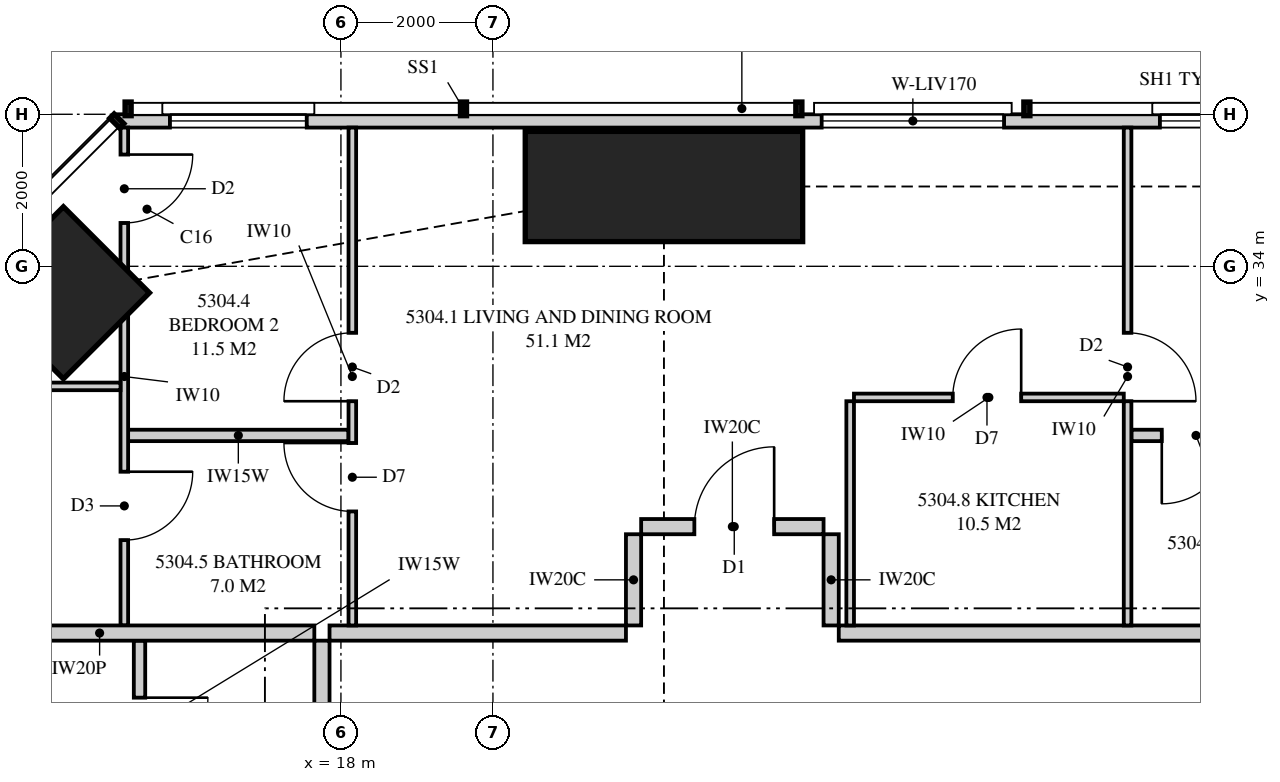
"""IFC4 building model, lengths in metres.
Left out: names, types, materials, properties, quantities, classifications, styles, units other than length and angle.
Written with IfcOpenShell. Run it as: python <this file> out.ifc"""

import sys

from ifc_helpers import new_model, si_unit, direction, frame, frame_2d, origin, origin_2d, place, context, subcontext, project, spatial, polyline, rectangle, outline, extrude, element, fill, save


model = new_model("IFC4")
c1 = context("Model", 3, precision=1e-05, world=origin(), true_north=direction((0.0, 1.0)))
c2 = subcontext(c1, "Body", "Model", "MODEL_VIEW")
j1 = project(units=[si_unit("LENGTHUNIT", "METRE"), si_unit("PLANEANGLEUNIT", "RADIAN")], contexts=[c1])
p1 = place(None, origin())
s1 = spatial("IfcSite", under=j1, at=p1, CompositionType="ELEMENT")
p2 = place(p1, origin())
s2 = spatial("IfcBuilding", under=s1, at=p2, CompositionType="ELEMENT")
p3 = place(p2, frame((0.0, 0.0, 194.55)))
s3 = spatial("IfcBuildingStorey", under=s2, at=p3, CompositionType="ELEMENT", Elevation=194.55)
p4 = place(p3, frame((22.25, 35.05, 0.0), z_axis=(0.0, 0.0, 1.0), x_axis=(0.0, 1.0, 0.0)))
e1 = element("IfcColumn", 1, at=p4, inside=s3, PredefinedType="COLUMN", context=c2, shape_type="SweptSolid", body=[
    extrude(rectangle(XDim=1.45, YDim=3.65, at=origin_2d()), origin(), (0.0, 0.0, 1.0), 3.35),
])
p5 = place(p3, frame((14.348, 33.652, 0.0), z_axis=(0.0, 0.0, 1.0), x_axis=(0.707106781187, 0.707106781187, 0.0)))
e2 = element("IfcColumn", 2, at=p5, inside=s3, PredefinedType="COLUMN", context=c2, shape_type="SweptSolid", body=[
    extrude(rectangle(XDim=1.6, YDim=1.6, at=origin_2d()), origin(), (0.0, 0.0, 1.0), 3.35),
])
p6 = place(p3, frame((49.949, 35.913, 0.0), z_axis=(0.0, 0.0, 1.0), x_axis=(-1.0, 0.0, 0.0)))
e3 = element("IfcWall", 3, at=p6, inside=s3, PredefinedType="SOLIDWALL", context=c2, shape_type="SweptSolid", body=[
    extrude(outline(polyline([(0.0, 0.0), (34.897, 0.0), (34.897, 3.11), (27.91, 3.11), (27.91, 2.15), (27.836, 2.15), (27.836, 3.11), (27.699, 3.11), (27.699, 2.15), (7.199, 2.15), (7.199, 3.11), (7.062, 3.11), (7.062, 2.15), (6.987, 2.15), (6.987, 3.11), (0.0, 3.11), (0.0, 0.0)])), frame((0.0, 0.087, 0.0), z_axis=(0.0, -1.0, 0.0), x_axis=(1.0, 0.0, 0.0)), (0.0, 0.0, 1.0), 0.175),
])
p7 = place(p6, frame((2.149, 0.0, 0.4)))
e4 = element("IfcOpeningElement", 4, at=p7, cuts=e3, PredefinedType="OPENING", context=c2, shape_type="SweptSolid", body=[
    extrude(rectangle(XDim=1.8, YDim=1.7, at=frame_2d((0.9, 0.85))), frame((0.0, 0.097, 0.0), z_axis=(0.0, -1.0, 0.0), x_axis=(1.0, 0.0, 0.0)), (0.0, 0.0, 1.0), 0.195),
])
p8 = place(p6, frame((9.636, 0.0, 0.4)))
e5 = element("IfcOpeningElement", 5, at=p8, cuts=e3, PredefinedType="OPENING", context=c2, shape_type="SweptSolid", body=[
    extrude(rectangle(XDim=1.8, YDim=1.7, at=frame_2d((0.9, 0.85))), frame((0.0, 0.097, 0.0), z_axis=(0.0, -1.0, 0.0), x_axis=(1.0, 0.0, 0.0)), (0.0, 0.0, 1.0), 0.195),
])
p9 = place(p6, frame((13.174, 0.0, 0.0)))
e6 = element("IfcOpeningElement", 6, at=p9, cuts=e3, PredefinedType="OPENING", context=c2, shape_type="SweptSolid", body=[
    extrude(rectangle(XDim=1.8, YDim=2.1, at=frame_2d((0.9, 1.05))), frame((0.0, 0.097, 0.0), z_axis=(0.0, -1.0, 0.0), x_axis=(1.0, 0.0, 0.0)), (0.0, 0.0, 1.0), 0.195),
])
p10 = place(p6, frame((19.374, 0.0, 0.4)))
e7 = element("IfcOpeningElement", 7, at=p10, cuts=e3, PredefinedType="OPENING", context=c2, shape_type="SweptSolid", body=[
    extrude(rectangle(XDim=1.8, YDim=1.7, at=frame_2d((0.9, 0.85))), frame((0.0, 0.097, 0.0), z_axis=(0.0, -1.0, 0.0), x_axis=(1.0, 0.0, 0.0)), (0.0, 0.0, 1.0), 0.195),
])
p11 = place(p6, frame((23.224, 0.0, 0.4)))
e8 = element("IfcOpeningElement", 8, at=p11, cuts=e3, PredefinedType="OPENING", context=c2, shape_type="SweptSolid", body=[
    extrude(rectangle(XDim=2.4, YDim=1.7, at=frame_2d((1.2, 0.85))), frame((0.0, 0.097, 0.0), z_axis=(0.0, -1.0, 0.0), x_axis=(1.0, 0.0, 0.0)), (0.0, 0.0, 1.0), 0.195),
])
p12 = place(p6, frame((32.399, 0.0, 0.4)))
e9 = element("IfcOpeningElement", 9, at=p12, cuts=e3, PredefinedType="OPENING", context=c2, shape_type="SweptSolid", body=[
    extrude(rectangle(XDim=1.8, YDim=1.7, at=frame_2d((0.9, 0.85))), frame((0.0, 0.097, 0.0), z_axis=(0.0, -1.0, 0.0), x_axis=(1.0, 0.0, 0.0)), (0.0, 0.0, 1.0), 0.195),
])
p13 = place(p3, frame((17.85, 29.175, 0.0), z_axis=(0.0, 0.0, 1.0), x_axis=(1.0, 0.0, 0.0)))
e10 = element("IfcWall", 10, at=p13, inside=s3, PredefinedType="PARTITIONING", context=c2, shape_type="SweptSolid", body=[
    extrude(rectangle(XDim=3.9, YDim=0.2, at=frame_2d((1.95, 0.0))), origin(), (0.0, 0.0, 1.0), 3.11),
])
p14 = place(p3, frame((15.15, 35.825, 0.0), z_axis=(0.0, 0.0, 1.0), x_axis=(0.0, -1.0, 0.0)))
e11 = element("IfcWall", 11, at=p14, inside=s3, PredefinedType="PARTITIONING", context=c2, shape_type="SweptSolid", body=[
    extrude(outline(polyline([(0.0, 0.0), (6.55, 0.0), (6.55, 3.11), (2.905, 3.11), (2.905, 2.15), (1.158, 2.15), (1.158, 3.11), (0.0, 3.11), (0.0, 0.0)])), frame((0.0, 0.05, 0.0), z_axis=(0.0, -1.0, 0.0), x_axis=(1.0, 0.0, 0.0)), (0.0, 0.0, 1.0), 0.1),
])
p15 = place(p14, frame((0.355, 0.0, 0.0)))
e12 = element("IfcOpeningElement", 12, at=p15, cuts=e11, PredefinedType="OPENING", context=c2, shape_type="SweptSolid", body=[
    extrude(rectangle(XDim=0.9, YDim=2.1, at=frame_2d((0.45, 1.05))), frame((0.0, 0.06, 0.0), z_axis=(0.0, -1.0, 0.0), x_axis=(1.0, 0.0, 0.0)), (0.0, 0.0, 1.0), 0.12),
])
p16 = place(p14, frame((4.527, 0.0, 0.0)))
e13 = element("IfcOpeningElement", 13, at=p16, cuts=e11, PredefinedType="OPENING", context=c2, shape_type="SweptSolid", body=[
    extrude(rectangle(XDim=0.9, YDim=2.1, at=frame_2d((0.45, 1.05))), frame((0.0, 0.06, 0.0), z_axis=(0.0, -1.0, 0.0), x_axis=(1.0, 0.0, 0.0)), (0.0, 0.0, 1.0), 0.12),
])
p17 = place(p3, frame((18.15, 35.825, 0.0), z_axis=(0.0, 0.0, 1.0), x_axis=(0.0, -1.0, 0.0)))
e14 = element("IfcWall", 14, at=p17, inside=s3, PredefinedType="PARTITIONING", context=c2, shape_type="SweptSolid", body=[
    extrude(outline(polyline([(0.0, 0.0), (6.55, 0.0), (6.55, 3.11), (2.374, 3.11), (2.374, 2.15), (0.627, 2.15), (0.627, 3.11), (0.0, 3.11), (0.0, 0.0)])), frame((0.0, 0.05, 0.0), z_axis=(0.0, -1.0, 0.0), x_axis=(1.0, 0.0, 0.0)), (0.0, 0.0, 1.0), 0.1),
])
p18 = place(p17, frame((2.7, 0.0, 0.0)))
e15 = element("IfcOpeningElement", 15, at=p18, cuts=e14, PredefinedType="OPENING", context=c2, shape_type="SweptSolid", body=[
    extrude(rectangle(XDim=0.9, YDim=2.1, at=frame_2d((0.45, 1.05))), frame((0.0, 0.06, 0.0), z_axis=(0.0, -1.0, 0.0), x_axis=(1.0, 0.0, 0.0)), (0.0, 0.0, 1.0), 0.12),
])
p19 = place(p17, frame((4.15, 0.0, 0.0)))
e16 = element("IfcOpeningElement", 16, at=p19, cuts=e14, PredefinedType="OPENING", context=c2, shape_type="SweptSolid", body=[
    extrude(rectangle(XDim=0.9, YDim=2.1, at=frame_2d((0.45, 1.05))), frame((0.0, 0.06, 0.0), z_axis=(0.0, -1.0, 0.0), x_axis=(1.0, 0.0, 0.0)), (0.0, 0.0, 1.0), 0.12),
])
p20 = place(p3, frame((28.35, 35.825, 0.0), z_axis=(0.0, 0.0, 1.0), x_axis=(0.0, -1.0, 0.0)))
e17 = element("IfcWall", 17, at=p20, inside=s3, PredefinedType="PARTITIONING", context=c2, shape_type="SweptSolid", body=[
    extrude(outline(polyline([(0.0, 0.0), (6.55, 0.0), (6.55, 3.11), (1.635, 3.11), (1.635, 2.15), (0.0, 2.15), (0.0, 3.11), (0.0, 0.0)])), frame((0.0, 0.05, 0.0), z_axis=(0.0, -1.0, 0.0), x_axis=(1.0, 0.0, 0.0)), (0.0, 0.0, 1.0), 0.1),
])
p21 = place(p20, frame((2.7, 0.0, 0.0)))
e18 = element("IfcOpeningElement", 18, at=p21, cuts=e17, PredefinedType="OPENING", context=c2, shape_type="SweptSolid", body=[
    extrude(rectangle(XDim=0.9, YDim=2.1, at=frame_2d((0.45, 1.05))), frame((0.0, 0.06, 0.0), z_axis=(0.0, -1.0, 0.0), x_axis=(1.0, 0.0, 0.0)), (0.0, 0.0, 1.0), 0.12),
])
p22 = place(p3, frame((12.0, 32.42, 0.0), z_axis=(0.0, 0.0, 1.0), x_axis=(1.0, 0.0, 0.0)))
e19 = element("IfcWall", 19, at=p22, inside=s3, PredefinedType="PARTITIONING", context=c2, shape_type="SweptSolid", body=[
    extrude(outline(polyline([(0.0, 0.0), (3.1, 0.0), (3.1, 3.11), (3.021, 3.11), (3.021, 2.15), (1.278, 2.15), (1.278, 3.11), (0.0, 3.11), (0.0, 0.0)])), frame((0.0, 0.05, 0.0), z_axis=(0.0, -1.0, 0.0), x_axis=(1.0, 0.0, 0.0)), (0.0, 0.0, 1.0), 0.1),
])
p23 = place(p22, frame((0.45, 0.0, 0.0)))
e20 = element("IfcOpeningElement", 20, at=p23, cuts=e19, PredefinedType="OPENING", context=c2, shape_type="SweptSolid", body=[
    extrude(rectangle(XDim=0.9, YDim=2.1, at=frame_2d((0.45, 1.05))), frame((0.0, 0.06, 0.0), z_axis=(0.0, -1.0, 0.0), x_axis=(1.0, 0.0, 0.0)), (0.0, 0.0, 1.0), 0.12),
])
p24 = place(p3, frame((15.2, 31.775, 0.0), z_axis=(0.0, 0.0, 1.0), x_axis=(1.0, 0.0, 0.0)))
e21 = element("IfcWall", 21, at=p24, inside=s3, PredefinedType="PLUMBINGWALL", context=c2, shape_type="SweptSolid", body=[
    extrude(rectangle(XDim=2.9, YDim=0.15, at=frame_2d((1.45, 0.0))), origin(), (0.0, 0.0, 1.0), 3.11),
])
p25 = place(p3, frame((28.4, 31.775, 0.0), z_axis=(0.0, 0.0, 1.0), x_axis=(1.0, 0.0, 0.0)))
e22 = element("IfcWall", 22, at=p25, inside=s3, PredefinedType="PLUMBINGWALL", context=c2, shape_type="SweptSolid", body=[
    extrude(outline(polyline([(0.0, 0.0), (5.8, 0.0), (5.8, 3.11), (4.412, 3.11), (4.412, 2.541), (3.788, 2.541), (3.788, 3.11), (0.0, 3.11), (0.0, 0.0)])), frame((0.0, 0.075, 0.0), z_axis=(0.0, -1.0, 0.0), x_axis=(1.0, 0.0, 0.0)), (0.0, 0.0, 1.0), 0.15),
])
p26 = place(p25, frame((0.4, 0.0, 0.0)))
e23 = element("IfcOpeningElement", 23, at=p26, cuts=e22, PredefinedType="OPENING", context=c2, shape_type="SweptSolid", body=[
    extrude(rectangle(XDim=0.9, YDim=2.1, at=frame_2d((0.45, 1.05))), frame((0.0, 0.085, 0.0), z_axis=(0.0, -1.0, 0.0), x_axis=(1.0, 0.0, 0.0)), (0.0, 0.0, 1.0), 0.17),
])
p27 = place(p3, frame((24.75, 32.275, 0.0), z_axis=(0.0, 0.0, 1.0), x_axis=(1.0, 0.0, 0.0)))
e24 = element("IfcWall", 24, at=p27, inside=s3, PredefinedType="PARTITIONING", context=c2, shape_type="SweptSolid", body=[
    extrude(rectangle(XDim=3.55, YDim=0.1, at=frame_2d((1.775, 0.0))), origin(), (0.0, 0.0, 1.0), 3.11),
])
p28 = place(p27, frame((1.3, 0.0, 0.0)))
e25 = element("IfcOpeningElement", 25, at=p28, cuts=e24, PredefinedType="OPENING", context=c2, shape_type="SweptSolid", body=[
    extrude(rectangle(XDim=0.9, YDim=2.1, at=frame_2d((0.45, 1.05))), frame((0.0, 0.06, 0.0), z_axis=(0.0, -1.0, 0.0), x_axis=(1.0, 0.0, 0.0)), (0.0, 0.0, 1.0), 0.12),
])
p29 = place(p3, frame((24.7, 32.225, 0.0), z_axis=(0.0, 0.0, 1.0), x_axis=(0.0, -1.0, 0.0)))
e26 = element("IfcWall", 26, at=p29, inside=s3, PredefinedType="PARTITIONING", context=c2, shape_type="SweptSolid", body=[
    extrude(rectangle(XDim=2.95, YDim=0.1, at=frame_2d((1.475, 0.0))), origin(), (0.0, 0.0, 1.0), 3.11),
])
p30 = place(p3, frame((12.0, 29.175, 0.0), z_axis=(0.0, 0.0, 1.0), x_axis=(1.0, 0.0, 0.0)))
e27 = element("IfcWall", 27, at=p30, inside=s3, PredefinedType="PARTITIONING", context=c2, shape_type="SweptSolid", body=[
    extrude(outline(polyline([(0.0, 0.0), (5.65, 0.0), (5.65, 3.11), (2.547, 3.11), (2.547, 2.15), (0.703, 2.15), (0.703, 3.11), (0.0, 3.11), (0.0, 0.0)])), frame((0.0, 0.1, 0.0), z_axis=(0.0, -1.0, 0.0), x_axis=(1.0, 0.0, 0.0)), (0.0, 0.0, 1.0), 0.2),
])
p31 = place(p3, frame((17.75, 7.925, 0.0), z_axis=(0.0, 0.0, 1.0), x_axis=(0.0, 1.0, 0.0)))
e28 = element("IfcWall", 28, at=p31, inside=s3, PredefinedType="PARTITIONING", context=c2, shape_type="SweptSolid", body=[
    extrude(outline(polyline([(0.0, 0.0), (21.15, 0.0), (21.15, 3.11), (17.412, 3.11), (17.412, 2.541), (16.738, 2.541), (16.738, 3.11), (5.412, 3.11), (5.412, 2.541), (4.738, 2.541), (4.738, 3.11), (0.0, 3.11), (0.0, 0.0)])), frame((0.0, 0.1, 0.0), z_axis=(0.0, -1.0, 0.0), x_axis=(1.0, 0.0, 0.0)), (0.0, 0.0, 1.0), 0.2),
])
p32 = place(p31, frame((16.25, 0.0, 0.0)))
e29 = element("IfcOpeningElement", 29, at=p32, cuts=e28, PredefinedType="OPENING", context=c2, shape_type="SweptSolid", body=[
    extrude(rectangle(XDim=1.05, YDim=2.2, at=frame_2d((0.525, 1.1))), frame((0.0, 0.11, 0.0), z_axis=(0.0, -1.0, 0.0), x_axis=(1.0, 0.0, 0.0)), (0.0, 0.0, 1.0), 0.22),
])
p33 = place(p3, frame((15.35, 26.65, 0.0), z_axis=(0.0, 0.0, 1.0), x_axis=(0.0, 1.0, 0.0)))
e30 = element("IfcWall", 30, at=p33, inside=s3, PredefinedType="PLUMBINGWALL", context=c2, shape_type="SweptSolid", body=[
    extrude(rectangle(XDim=2.425, YDim=0.15, at=frame_2d((1.212, 0.0))), origin(), (0.0, 0.0, 1.0), 3.11),
])
p34 = place(p33, frame((0.775, 0.0, 0.0)))
e31 = element("IfcOpeningElement", 31, at=p34, cuts=e30, PredefinedType="OPENING", context=c2, shape_type="SweptSolid", body=[
    extrude(rectangle(XDim=0.9, YDim=2.1, at=frame_2d((0.45, 1.05))), frame((0.0, 0.085, 0.0), z_axis=(0.0, -1.0, 0.0), x_axis=(1.0, 0.0, 0.0)), (0.0, 0.0, 1.0), 0.17),
])
p35 = place(p3, frame((24.55, 29.175, 0.0), z_axis=(0.0, 0.0, 1.0), x_axis=(1.0, 0.0, 0.0)))
e32 = element("IfcWall", 32, at=p35, inside=s3, PredefinedType="PARTITIONING", context=c2, shape_type="SweptSolid", body=[
    extrude(outline(polyline([(0.0, 0.0), (9.65, 0.0), (9.65, 3.11), (8.287, 3.11), (8.287, 2.541), (7.613, 2.541), (7.613, 3.11), (0.0, 3.11), (0.0, 0.0)])), frame((0.0, 0.1, 0.0), z_axis=(0.0, -1.0, 0.0), x_axis=(1.0, 0.0, 0.0)), (0.0, 0.0, 1.0), 0.2),
])
p36 = place(p3, frame((21.95, 30.575, 0.0), z_axis=(0.0, 0.0, 1.0), x_axis=(1.0, 0.0, 0.0)))
e33 = element("IfcWall", 33, at=p36, inside=s3, PredefinedType="PARTITIONING", context=c2, shape_type="SweptSolid", body=[
    extrude(outline(polyline([(0.0, 0.0), (2.4, 0.0), (2.4, 3.11), (0.637, 3.11), (0.637, 2.541), (0.0, 2.541), (0.0, 3.11), (0.0, 0.0)])), frame((0.0, 0.1, 0.0), z_axis=(0.0, -1.0, 0.0), x_axis=(1.0, 0.0, 0.0)), (0.0, 0.0, 1.0), 0.2),
])
p37 = place(p36, frame((0.7, 0.0, 0.0)))
e34 = element("IfcOpeningElement", 34, at=p37, cuts=e33, PredefinedType="OPENING", context=c2, shape_type="SweptSolid", body=[
    extrude(rectangle(XDim=1.05, YDim=2.2, at=frame_2d((0.525, 1.1))), frame((0.0, 0.11, 0.0), z_axis=(0.0, -1.0, 0.0), x_axis=(1.0, 0.0, 0.0)), (0.0, 0.0, 1.0), 0.22),
])
for number, where, z_axis, x_axis in (
    (35, (21.85, 29.275, 0.0), (0.0, 0.0, 1.0), (0.0, 1.0, 0.0)),
    (36, (24.45, 29.275, 0.0), (0.0, 0.0, 1.0), (0.0, 1.0, 0.0)),
):
    element("IfcWall", number, at=place(p3, frame(where, z_axis=z_axis, x_axis=x_axis)), inside=s3, PredefinedType="PARTITIONING", context=c2, shape_type="SweptSolid", body=[
        extrude(rectangle(XDim=1.2, YDim=0.2, at=frame_2d((0.6, 0.0))), origin(), (0.0, 0.0, 1.0), 3.11),
    ])
p38 = place(p10, origin())
e37 = element("IfcWindow", 37, at=p38, inside=s3, PartitioningType="SINGLE_PANEL", PredefinedType="WINDOW", context=c2, shape_type="SweptSolid", body=[
    extrude(rectangle(XDim=1.8, YDim=1.7, at=frame_2d((0.9, 0.85))), frame((0.0, 0.03, 0.0), z_axis=(0.0, -1.0, 0.0), x_axis=(1.0, 0.0, 0.0)), (0.0, 0.0, 1.0), 0.06),
])
fill(e7, e37)
p39 = place(p11, origin())
e38 = element("IfcWindow", 38, at=p39, inside=s3, PartitioningType="SINGLE_PANEL", PredefinedType="WINDOW", context=c2, shape_type="SweptSolid", body=[
    extrude(rectangle(XDim=2.4, YDim=1.7, at=frame_2d((1.2, 0.85))), frame((0.0, 0.03, 0.0), z_axis=(0.0, -1.0, 0.0), x_axis=(1.0, 0.0, 0.0)), (0.0, 0.0, 1.0), 0.06),
])
fill(e8, e38)
p40 = place(p12, origin())
e39 = element("IfcWindow", 39, at=p40, inside=s3, PartitioningType="SINGLE_PANEL", PredefinedType="WINDOW", context=c2, shape_type="SweptSolid", body=[
    extrude(rectangle(XDim=1.8, YDim=1.7, at=frame_2d((0.9, 0.85))), frame((0.0, 0.03, 0.0), z_axis=(0.0, -1.0, 0.0), x_axis=(1.0, 0.0, 0.0)), (0.0, 0.0, 1.0), 0.06),
])
fill(e9, e39)
p41 = place(p37, origin())
e40 = element("IfcDoor", 40, at=p41, inside=s3, OperationType="SINGLE_SWING_RIGHT", PredefinedType="DOOR", context=c2, shape_type="SweptSolid", body=[
    extrude(rectangle(XDim=1.05, YDim=2.2, at=frame_2d((0.525, 1.1))), frame((0.0, 0.025, 0.0), z_axis=(0.0, -1.0, 0.0), x_axis=(1.0, 0.0, 0.0)), (0.0, 0.0, 1.0), 0.05),
])
fill(e34, e40)
p42 = place(p15, origin())
e41 = element("IfcDoor", 41, at=p42, inside=s3, OperationType="SINGLE_SWING_LEFT", PredefinedType="DOOR", context=c2, shape_type="SweptSolid", body=[
    extrude(rectangle(XDim=0.9, YDim=2.1, at=frame_2d((0.45, 1.05))), frame((0.0, 0.025, 0.0), z_axis=(0.0, -1.0, 0.0), x_axis=(1.0, 0.0, 0.0)), (0.0, 0.0, 1.0), 0.05),
])
fill(e12, e41)
p43 = place(p18, frame((0.9, 0.0, 0.0), z_axis=(0.0, 0.0, 1.0), x_axis=(-1.0, 0.0, 0.0)))
e42 = element("IfcDoor", 42, at=p43, inside=s3, OperationType="SINGLE_SWING_LEFT", PredefinedType="DOOR", context=c2, shape_type="SweptSolid", body=[
    extrude(rectangle(XDim=0.9, YDim=2.1, at=frame_2d((0.45, 1.05))), frame((0.0, 0.025, 0.0), z_axis=(0.0, -1.0, 0.0), x_axis=(1.0, 0.0, 0.0)), (0.0, 0.0, 1.0), 0.05),
])
fill(e15, e42)
p44 = place(p19, frame((0.9, 0.0, 0.0), z_axis=(0.0, 0.0, 1.0), x_axis=(-1.0, 0.0, 0.0)))
e43 = element("IfcDoor", 43, at=p44, inside=s3, OperationType="SINGLE_SWING_RIGHT", PredefinedType="DOOR", context=c2, shape_type="SweptSolid", body=[
    extrude(rectangle(XDim=0.9, YDim=2.1, at=frame_2d((0.45, 1.05))), frame((0.0, 0.025, 0.0), z_axis=(0.0, -1.0, 0.0), x_axis=(1.0, 0.0, 0.0)), (0.0, 0.0, 1.0), 0.05),
])
fill(e16, e43)
p45 = place(p21, origin())
e44 = element("IfcDoor", 44, at=p45, inside=s3, OperationType="SINGLE_SWING_RIGHT", PredefinedType="DOOR", context=c2, shape_type="SweptSolid", body=[
    extrude(rectangle(XDim=0.9, YDim=2.1, at=frame_2d((0.45, 1.05))), frame((0.0, 0.025, 0.0), z_axis=(0.0, -1.0, 0.0), x_axis=(1.0, 0.0, 0.0)), (0.0, 0.0, 1.0), 0.05),
])
fill(e18, e44)
p46 = place(p26, frame((0.9, 0.0, 0.0), z_axis=(0.0, 0.0, 1.0), x_axis=(-1.0, 0.0, 0.0)))
e45 = element("IfcDoor", 45, at=p46, inside=s3, OperationType="SINGLE_SWING_RIGHT", PredefinedType="DOOR", context=c2, shape_type="SweptSolid", body=[
    extrude(rectangle(XDim=0.9, YDim=2.1, at=frame_2d((0.45, 1.05))), frame((0.0, 0.025, 0.0), z_axis=(0.0, -1.0, 0.0), x_axis=(1.0, 0.0, 0.0)), (0.0, 0.0, 1.0), 0.05),
])
fill(e23, e45)
p47 = place(p16, origin())
e46 = element("IfcDoor", 46, at=p47, inside=s3, OperationType="SINGLE_SWING_LEFT", PredefinedType="DOOR", context=c2, shape_type="SweptSolid", body=[
    extrude(rectangle(XDim=0.9, YDim=2.1, at=frame_2d((0.45, 1.05))), frame((0.0, 0.025, 0.0), z_axis=(0.0, -1.0, 0.0), x_axis=(1.0, 0.0, 0.0)), (0.0, 0.0, 1.0), 0.05),
])
fill(e13, e46)
p48 = place(p28, origin())
e47 = element("IfcDoor", 47, at=p48, inside=s3, OperationType="SINGLE_SWING_RIGHT", PredefinedType="DOOR", context=c2, shape_type="SweptSolid", body=[
    extrude(rectangle(XDim=0.9, YDim=2.1, at=frame_2d((0.45, 1.05))), frame((0.0, 0.025, 0.0), z_axis=(0.0, -1.0, 0.0), x_axis=(1.0, 0.0, 0.0)), (0.0, 0.0, 1.0), 0.05),
])
fill(e25, e47)
p49 = place(p34, frame((0.9, 0.0, 0.0), z_axis=(0.0, 0.0, 1.0), x_axis=(-1.0, 0.0, 0.0)))
e48 = element("IfcDoor", 48, at=p49, inside=s3, OperationType="SINGLE_SWING_LEFT", PredefinedType="DOOR", context=c2, shape_type="SweptSolid", body=[
    extrude(rectangle(XDim=0.9, YDim=2.1, at=frame_2d((0.45, 1.05))), frame((0.0, 0.025, 0.0), z_axis=(0.0, -1.0, 0.0), x_axis=(1.0, 0.0, 0.0)), (0.0, 0.0, 1.0), 0.05),
])
fill(e31, e48)
save(model, sys.argv[1])
